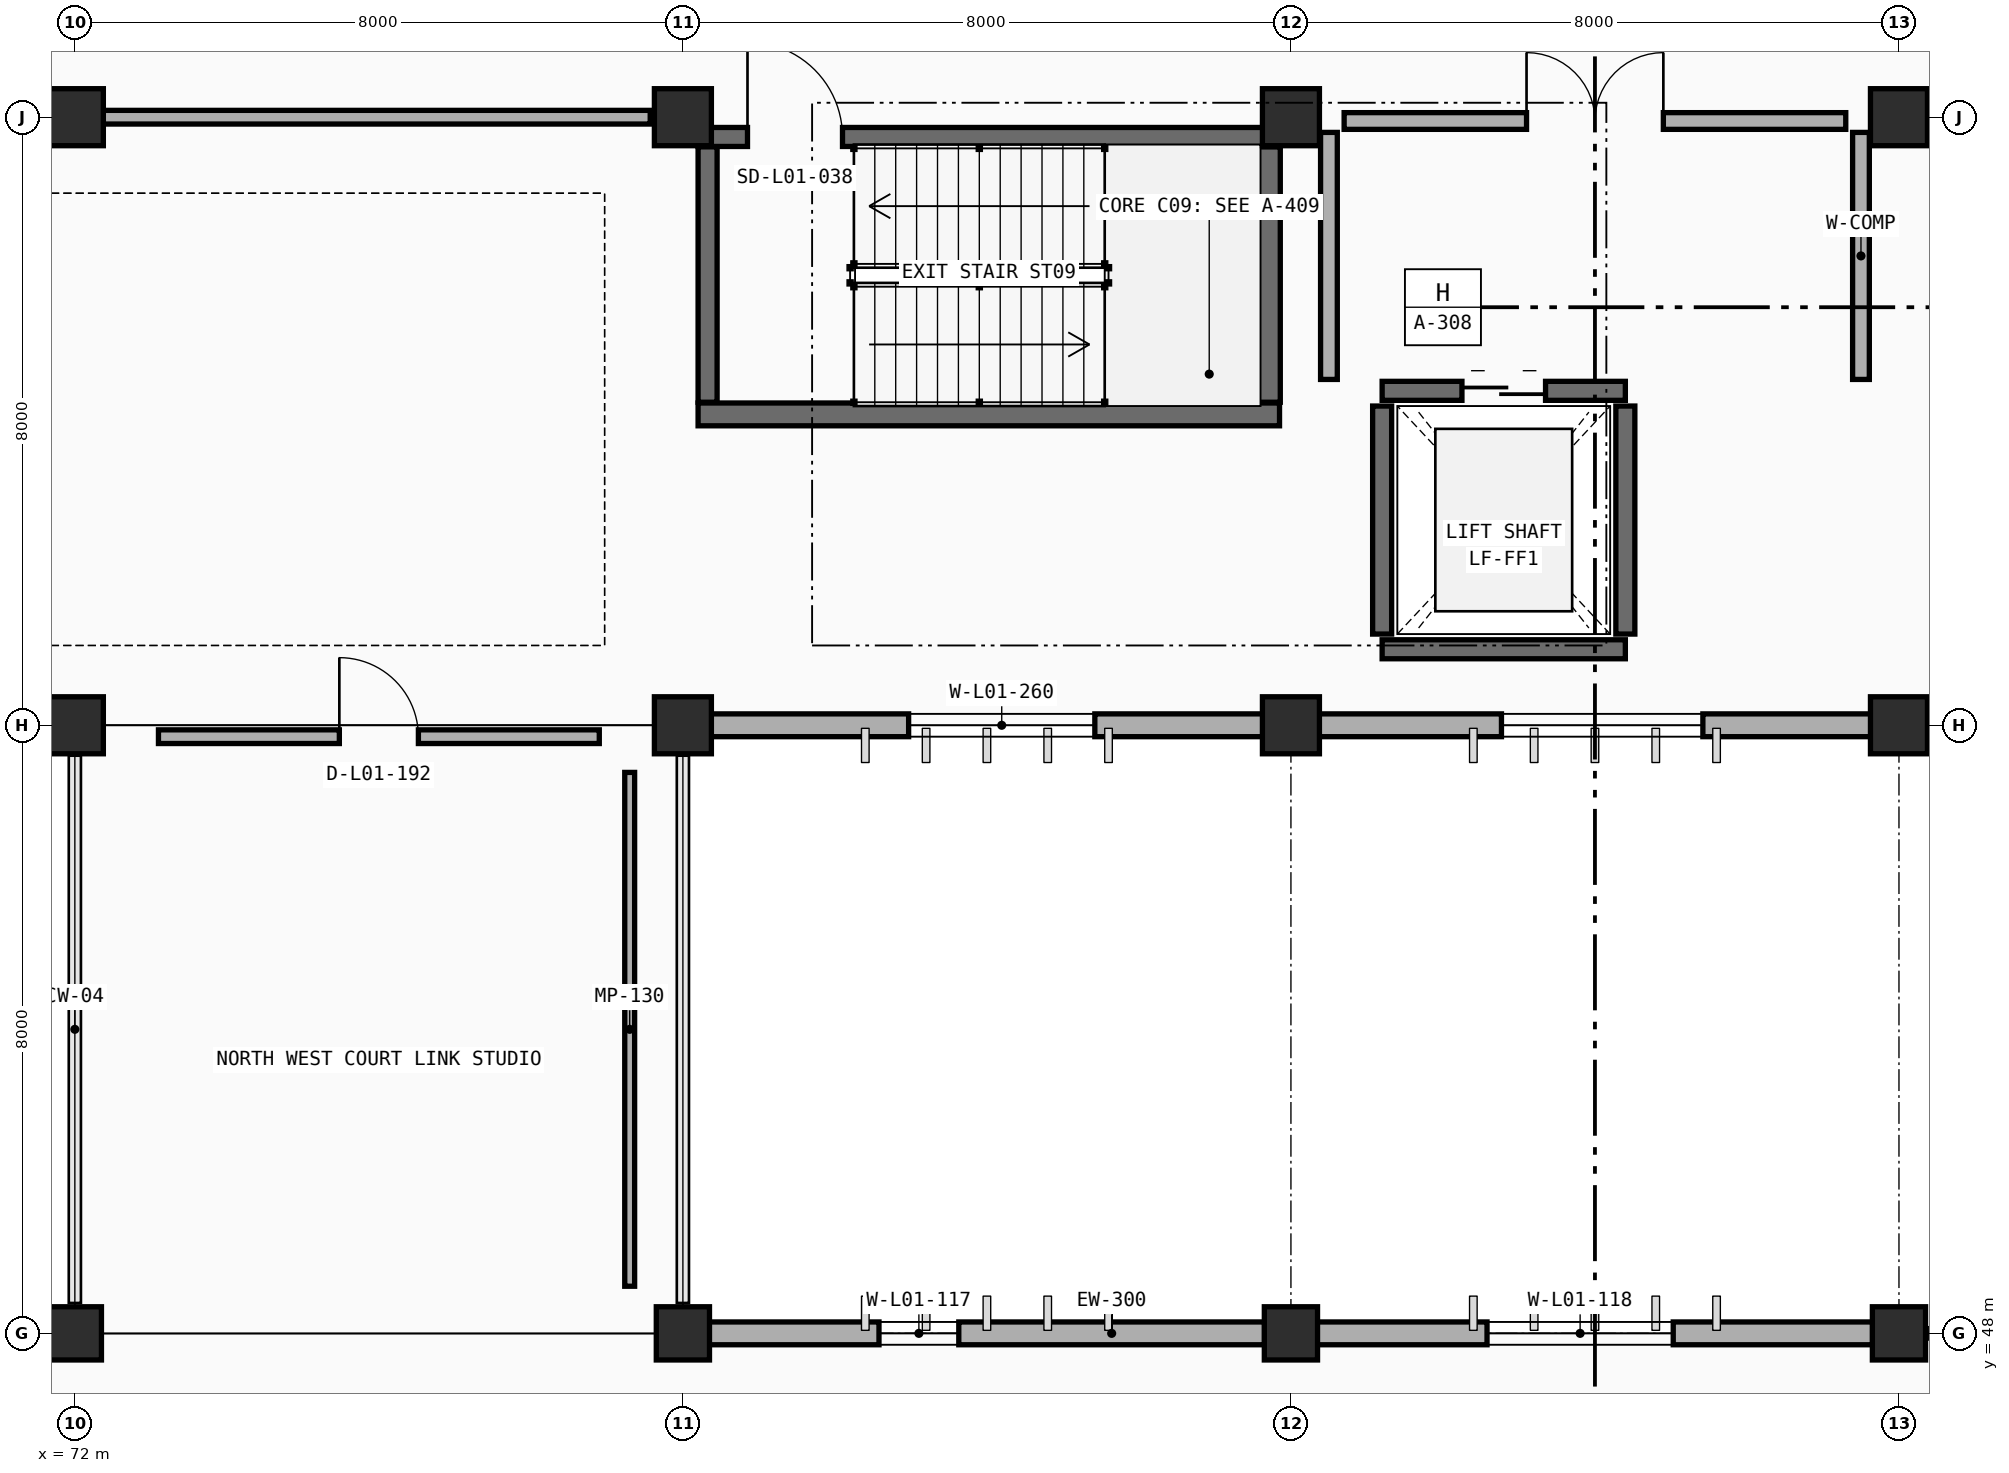
"""IFC4 building model, lengths in metres.
Left out: names, types, materials, properties, quantities, classifications, styles, units other than length and angle.
Written with IfcOpenShell. Run it as: python <this file> out.ifc"""

import sys

from ifc_helpers import new_model, si_unit, direction, frame, frame_2d, origin, origin_2d, place, context, subcontext, project, spatial, rectangle, extrude, element, fill, save


model = new_model("IFC4")
c1 = context("Model", 3, precision=1e-05, world=origin(), true_north=direction((0.0, 1.0)))
c2 = subcontext(c1, "Body", "Model", "MODEL_VIEW")
j1 = project(units=[si_unit("LENGTHUNIT", "METRE"), si_unit("PLANEANGLEUNIT", "RADIAN")], contexts=[c1])
p1 = place(None, origin())
s1 = spatial("IfcSite", under=j1, at=p1, CompositionType="ELEMENT")
p2 = place(p1, origin())
s2 = spatial("IfcBuilding", under=s1, at=p2, CompositionType="ELEMENT")
p3 = place(p2, origin())
s3 = spatial("IfcBuildingStorey", under=s2, at=p3, CompositionType="ELEMENT", Elevation=0.0)
for number, where, z_axis, x_axis in (
    (1, (72.0, 48.0, 0.0), (0.0, 0.0, 1.0), (1.0, 0.0, 0.0)),
    (2, (80.0, 48.0, 0.0), (0.0, 0.0, 1.0), (1.0, 0.0, 0.0)),
    (3, (88.0, 48.0, 0.0), (0.0, 0.0, 1.0), (1.0, 0.0, 0.0)),
    (4, (96.0, 48.0, 0.0), (0.0, 0.0, 1.0), (1.0, 0.0, 0.0)),
):
    element("IfcColumn", number, at=place(p3, frame(where, z_axis=z_axis, x_axis=x_axis)), inside=s3, PredefinedType="COLUMN", context=c2, shape_type="SweptSolid", body=[
        extrude(rectangle(XDim=0.7, YDim=0.7, at=origin_2d()), origin(), (0.0, 0.0, 1.0), 4.8),
    ])
for number, where, z_axis, x_axis in (
    (5, (72.0, 56.0, 0.0), (0.0, 0.0, 1.0), (1.0, 0.0, 0.0)),
    (6, (80.0, 56.0, 0.0), (0.0, 0.0, 1.0), (1.0, 0.0, 0.0)),
    (7, (88.0, 56.0, 0.0), (0.0, 0.0, 1.0), (1.0, 0.0, 0.0)),
    (8, (96.0, 56.0, 0.0), (0.0, 0.0, 1.0), (1.0, 0.0, 0.0)),
    (9, (72.0, 64.0, 0.0), (0.0, 0.0, 1.0), (1.0, 0.0, 0.0)),
    (10, (80.0, 64.0, 0.0), (0.0, 0.0, 1.0), (1.0, 0.0, 0.0)),
    (11, (88.0, 64.0, 0.0), (0.0, 0.0, 1.0), (1.0, 0.0, 0.0)),
    (12, (96.0, 64.0, 0.0), (0.0, 0.0, 1.0), (1.0, 0.0, 0.0)),
):
    element("IfcColumn", number, at=place(p3, frame(where, z_axis=z_axis, x_axis=x_axis)), inside=s3, PredefinedType="COLUMN", context=c2, shape_type="SweptSolid", body=[
        extrude(rectangle(XDim=0.75, YDim=0.75, at=origin_2d()), origin(), (0.0, 0.0, 1.0), 4.8),
    ])
p4 = place(p3, frame((80.347, 48.0, 0.0), z_axis=(0.0, 0.0, 1.0), x_axis=(1.0, 0.0, 0.0)))
e13 = element("IfcWall", 13, at=p4, inside=s3, PredefinedType="STANDARD", context=c2, shape_type="SweptSolid", body=[
    extrude(rectangle(XDim=7.306, YDim=0.3, at=frame_2d((3.653, 0.0))), origin(), (0.0, 0.0, 1.0), 3.91),
])
p5 = place(p4, frame((2.233, 0.0, 0.9)))
e14 = element("IfcOpeningElement", 14, at=p5, cuts=e13, PredefinedType="OPENING", context=c2, shape_type="SweptSolid", body=[
    extrude(rectangle(XDim=1.05, YDim=1.55, at=frame_2d((0.525, 0.775))), frame((0.0, 0.16, 0.0), z_axis=(0.0, -1.0, 0.0), x_axis=(1.0, 0.0, 0.0)), (0.0, 0.0, 1.0), 0.32),
])
p6 = place(p3, frame((88.347, 48.0, 0.0), z_axis=(0.0, 0.0, 1.0), x_axis=(1.0, 0.0, 0.0)))
e15 = element("IfcWall", 15, at=p6, inside=s3, PredefinedType="STANDARD", context=c2, shape_type="SweptSolid", body=[
    extrude(rectangle(XDim=7.306, YDim=0.3, at=frame_2d((3.653, 0.0))), origin(), (0.0, 0.0, 1.0), 3.91),
])
p7 = place(p6, frame((2.233, 0.0, 0.9)))
e16 = element("IfcOpeningElement", 16, at=p7, cuts=e15, PredefinedType="OPENING", context=c2, shape_type="SweptSolid", body=[
    extrude(rectangle(XDim=2.45, YDim=1.4, at=frame_2d((1.225, 0.7))), frame((0.0, 0.16, 0.0), z_axis=(0.0, -1.0, 0.0), x_axis=(1.0, 0.0, 0.0)), (0.0, 0.0, 1.0), 0.32),
])
p8 = place(p3, frame((87.628, 56.0, 0.0), z_axis=(0.0, 0.0, 1.0), x_axis=(-1.0, 0.0, 0.0)))
e17 = element("IfcWall", 17, at=p8, inside=s3, PredefinedType="STANDARD", context=c2, shape_type="SweptSolid", body=[
    extrude(rectangle(XDim=7.256, YDim=0.3, at=frame_2d((3.628, 0.0))), origin(), (0.0, 0.0, 1.0), 3.91),
])
p9 = place(p8, frame((2.208, 0.0, 0.9)))
e18 = element("IfcOpeningElement", 18, at=p9, cuts=e17, PredefinedType="OPENING", context=c2, shape_type="SweptSolid", body=[
    extrude(rectangle(XDim=2.45, YDim=1.85, at=frame_2d((1.225, 0.925))), frame((0.0, 0.16, 0.0), z_axis=(0.0, -1.0, 0.0), x_axis=(1.0, 0.0, 0.0)), (0.0, 0.0, 1.0), 0.32),
])
p10 = place(p3, frame((95.628, 56.0, 0.0), z_axis=(0.0, 0.0, 1.0), x_axis=(-1.0, 0.0, 0.0)))
e19 = element("IfcWall", 19, at=p10, inside=s3, PredefinedType="STANDARD", context=c2, shape_type="SweptSolid", body=[
    extrude(rectangle(XDim=7.256, YDim=0.3, at=frame_2d((3.628, 0.0))), origin(), (0.0, 0.0, 1.0), 3.91),
])
p11 = place(p10, frame((2.208, 0.0, 0.9)))
e20 = element("IfcOpeningElement", 20, at=p11, cuts=e19, PredefinedType="OPENING", context=c2, shape_type="SweptSolid", body=[
    extrude(rectangle(XDim=2.65, YDim=1.85, at=frame_2d((1.325, 0.925))), frame((0.0, 0.16, 0.0), z_axis=(0.0, -1.0, 0.0), x_axis=(1.0, 0.0, 0.0)), (0.0, 0.0, 1.0), 0.32),
])
p12 = place(p3, frame((103.628, 56.0, 0.0), z_axis=(0.0, 0.0, 1.0), x_axis=(-1.0, 0.0, 0.0)))
e21 = element("IfcWall", 21, at=p12, inside=s3, PredefinedType="STANDARD", context=c2, shape_type="SweptSolid", body=[
    extrude(rectangle(XDim=7.256, YDim=0.3, at=frame_2d((3.628, 0.0))), origin(), (0.0, 0.0, 1.0), 3.91),
])
p13 = place(p12, frame((2.208, 0.0, 0.9)))
e22 = element("IfcOpeningElement", 22, at=p13, cuts=e21, PredefinedType="OPENING", context=c2, shape_type="SweptSolid", body=[
    extrude(rectangle(XDim=2.85, YDim=1.85, at=frame_2d((1.425, 0.925))), frame((0.0, 0.16, 0.0), z_axis=(0.0, -1.0, 0.0), x_axis=(1.0, 0.0, 0.0)), (0.0, 0.0, 1.0), 0.32),
])
p14 = place(p3, frame((80.2, 60.09, 0.0), z_axis=(0.0, 0.0, 1.0), x_axis=(1.0, 0.0, 0.0)))
e23 = element("IfcWall", 23, at=p14, inside=s3, PredefinedType="SHEAR", context=c2, shape_type="SweptSolid", body=[
    extrude(rectangle(XDim=7.65, YDim=0.3, at=frame_2d((3.825, 0.0))), origin(), (0.0, 0.0, 1.0), 4.8),
])
p15 = place(p3, frame((87.71, 60.25, 0.0), z_axis=(0.0, 0.0, 1.0), x_axis=(0.0, 1.0, 0.0)))
e24 = element("IfcWall", 24, at=p15, inside=s3, PredefinedType="SHEAR", context=c2, shape_type="SweptSolid", body=[
    extrude(rectangle(XDim=3.36, YDim=0.3, at=frame_2d((1.68, 0.0))), origin(), (0.0, 0.0, 1.0), 4.8),
])
p16 = place(p3, frame((80.2, 63.74, 0.0), z_axis=(0.0, 0.0, 1.0), x_axis=(1.0, 0.0, 0.0)))
e25 = element("IfcWall", 25, at=p16, inside=s3, PredefinedType="SOLIDWALL", context=c2, shape_type="SweptSolid", body=[
    extrude(rectangle(XDim=7.65, YDim=0.25, at=frame_2d((3.825, 0.0))), origin(), (0.0, 0.0, 1.0), 4.8),
])
p17 = place(p16, frame((0.65, 0.0, 0.0)))
e26 = element("IfcOpeningElement", 26, at=p17, cuts=e25, PredefinedType="OPENING", context=c2, shape_type="SweptSolid", body=[
    extrude(rectangle(XDim=1.25, YDim=2.15, at=frame_2d((0.625, 1.075))), frame((0.0, 0.135, 0.0), z_axis=(0.0, -1.0, 0.0), x_axis=(1.0, 0.0, 0.0)), (0.0, 0.0, 1.0), 0.27),
])
p18 = place(p3, frame((80.325, 60.25, 0.0), z_axis=(0.0, 0.0, 1.0), x_axis=(0.0, 1.0, 0.0)))
e27 = element("IfcWall", 27, at=p18, inside=s3, PredefinedType="SOLIDWALL", context=c2, shape_type="SweptSolid", body=[
    extrude(rectangle(XDim=3.36, YDim=0.25, at=frame_2d((1.68, 0.0))), origin(), (0.0, 0.0, 1.0), 4.8),
])
p19 = place(p3, frame((89.2, 57.0, 0.0), z_axis=(0.0, 0.0, 1.0), x_axis=(1.0, 0.0, 0.0)))
e28 = element("IfcWall", 28, at=p19, inside=s3, PredefinedType="SOLIDWALL", context=c2, shape_type="SweptSolid", body=[
    extrude(rectangle(XDim=3.2, YDim=0.25, at=frame_2d((1.6, 0.0))), origin(), (0.0, 0.0, 1.0), 4.8),
])
p20 = place(p3, frame((89.2, 60.4, 0.0), z_axis=(0.0, 0.0, 1.0), x_axis=(1.0, 0.0, 0.0)))
e29 = element("IfcWall", 29, at=p20, inside=s3, PredefinedType="SOLIDWALL", context=c2, shape_type="SweptSolid", body=[
    extrude(rectangle(XDim=3.2, YDim=0.25, at=frame_2d((1.6, 0.0))), origin(), (0.0, 0.0, 1.0), 4.8),
])
p21 = place(p20, frame((1.05, 0.0, 0.0)))
e30 = element("IfcOpeningElement", 30, at=p21, cuts=e29, PredefinedType="OPENING", context=c2, shape_type="SweptSolid", body=[
    extrude(rectangle(XDim=1.1, YDim=2.15, at=frame_2d((0.55, 1.075))), frame((0.0, 0.135, 0.0), z_axis=(0.0, -1.0, 0.0), x_axis=(1.0, 0.0, 0.0)), (0.0, 0.0, 1.0), 0.27),
])
for number, where, z_axis, x_axis in (
    (31, (89.2, 57.2, 0.0), (0.0, 0.0, 1.0), (0.0, 1.0, 0.0)),
    (32, (92.4, 57.2, 0.0), (0.0, 0.0, 1.0), (0.0, 1.0, 0.0)),
):
    element("IfcWall", number, at=place(p3, frame(where, z_axis=z_axis, x_axis=x_axis)), inside=s3, PredefinedType="SOLIDWALL", context=c2, shape_type="SweptSolid", body=[
        extrude(rectangle(XDim=3.0, YDim=0.25, at=frame_2d((1.5, 0.0))), origin(), (0.0, 0.0, 1.0), 4.8),
    ])
p22 = place(p3, frame((88.7, 63.95, 0.0), z_axis=(0.0, 0.0, 1.0), x_axis=(1.0, 0.0, 0.0)))
e33 = element("IfcWall", 33, at=p22, inside=s3, PredefinedType="PARTITIONING", context=c2, shape_type="SweptSolid", body=[
    extrude(rectangle(XDim=6.6, YDim=0.22, at=frame_2d((3.3, 0.0))), origin(), (0.0, 0.0, 1.0), 3.81),
])
p23 = place(p22, frame((2.4, 0.0, 0.0)))
e34 = element("IfcOpeningElement", 34, at=p23, cuts=e33, PredefinedType="OPENING", context=c2, shape_type="SweptSolid", body=[
    extrude(rectangle(XDim=1.8, YDim=2.2, at=frame_2d((0.9, 1.1))), frame((0.0, 0.12, 0.0), z_axis=(0.0, -1.0, 0.0), x_axis=(1.0, 0.0, 0.0)), (0.0, 0.0, 1.0), 0.24),
])
for number, where, z_axis, x_axis in (
    (35, (88.5, 60.55, 0.0), (0.0, 0.0, 1.0), (0.0, 1.0, 0.0)),
    (36, (95.5, 60.55, 0.0), (0.0, 0.0, 1.0), (0.0, 1.0, 0.0)),
):
    element("IfcWall", number, at=place(p3, frame(where, z_axis=z_axis, x_axis=x_axis)), inside=s3, PredefinedType="PARTITIONING", context=c2, shape_type="SweptSolid", body=[
        extrude(rectangle(XDim=3.25, YDim=0.22, at=frame_2d((1.625, 0.0))), origin(), (0.0, 0.0, 1.0), 3.76),
    ])
p24 = place(p3, frame((56.43, 64.0, 0.0), z_axis=(0.0, 0.0, 1.0), x_axis=(1.0, 0.0, 0.0)))
e37 = element("IfcWall", 37, at=p24, inside=s3, PredefinedType="PARTITIONING", context=c2, shape_type="SweptSolid", body=[
    extrude(rectangle(XDim=23.14, YDim=0.18, at=frame_2d((11.57, 0.0))), origin(), (0.0, 0.0, 1.0), 3.81),
])
p25 = place(p24, frame((2.92, 0.0, 0.0)))
e38 = element("IfcOpeningElement", 38, at=p25, cuts=e37, PredefinedType="OPENING", context=c2, shape_type="SweptSolid", body=[
    extrude(rectangle(XDim=1.3, YDim=2.18, at=frame_2d((0.65, 1.09))), frame((0.0, 0.1, 0.0), z_axis=(0.0, -1.0, 0.0), x_axis=(1.0, 0.0, 0.0)), (0.0, 0.0, 1.0), 0.2),
])
p26 = place(p3, frame((73.1, 55.85, 0.0), z_axis=(0.0, 0.0, 1.0), x_axis=(1.0, 0.0, 0.0)))
e39 = element("IfcWall", 39, at=p26, inside=s3, PredefinedType="PARTITIONING", context=c2, shape_type="SweptSolid", body=[
    extrude(rectangle(XDim=5.8, YDim=0.18, at=frame_2d((2.9, 0.0))), origin(), (0.0, 0.0, 1.0), 3.9),
])
p27 = place(p26, frame((2.38, 0.0, 0.0)))
e40 = element("IfcOpeningElement", 40, at=p27, cuts=e39, PredefinedType="OPENING", context=c2, shape_type="SweptSolid", body=[
    extrude(rectangle(XDim=1.04, YDim=2.15, at=frame_2d((0.52, 1.075))), frame((0.0, 0.1, 0.0), z_axis=(0.0, -1.0, 0.0), x_axis=(1.0, 0.0, 0.0)), (0.0, 0.0, 1.0), 0.2),
])
p28 = place(p3, frame((79.3, 48.62, 0.0), z_axis=(0.0, 0.0, 1.0), x_axis=(0.0, 1.0, 0.0)))
e41 = element("IfcWall", 41, at=p28, inside=s3, PredefinedType="MOVABLE", context=c2, shape_type="SweptSolid", body=[
    extrude(rectangle(XDim=6.76, YDim=0.13, at=frame_2d((3.38, 0.0))), origin(), (0.0, 0.0, 1.0), 3.9),
])
p29 = place(p5, origin())
e42 = element("IfcWindow", 42, at=p29, inside=s3, PartitioningType="SINGLE_PANEL", PredefinedType="WINDOW", context=c2, shape_type="SweptSolid", body=[
    extrude(rectangle(XDim=1.05, YDim=1.55, at=frame_2d((0.525, 0.775))), frame((0.0, 0.03, 0.0), z_axis=(0.0, -1.0, 0.0), x_axis=(1.0, 0.0, 0.0)), (0.0, 0.0, 1.0), 0.06),
])
fill(e14, e42)
p30 = place(p7, origin())
e43 = element("IfcWindow", 43, at=p30, inside=s3, PartitioningType="DOUBLE_PANEL_VERTICAL", PredefinedType="WINDOW", context=c2, shape_type="SweptSolid", body=[
    extrude(rectangle(XDim=2.45, YDim=1.4, at=frame_2d((1.225, 0.7))), frame((0.0, 0.03, 0.0), z_axis=(0.0, -1.0, 0.0), x_axis=(1.0, 0.0, 0.0)), (0.0, 0.0, 1.0), 0.06),
])
fill(e16, e43)
p31 = place(p9, origin())
e44 = element("IfcWindow", 44, at=p31, inside=s3, PartitioningType="DOUBLE_PANEL_VERTICAL", PredefinedType="WINDOW", context=c2, shape_type="SweptSolid", body=[
    extrude(rectangle(XDim=2.45, YDim=1.85, at=frame_2d((1.225, 0.925))), frame((0.0, 0.03, 0.0), z_axis=(0.0, -1.0, 0.0), x_axis=(1.0, 0.0, 0.0)), (0.0, 0.0, 1.0), 0.06),
])
fill(e18, e44)
p32 = place(p11, origin())
e45 = element("IfcWindow", 45, at=p32, inside=s3, PartitioningType="DOUBLE_PANEL_VERTICAL", PredefinedType="WINDOW", context=c2, shape_type="SweptSolid", body=[
    extrude(rectangle(XDim=2.65, YDim=1.85, at=frame_2d((1.325, 0.925))), frame((0.0, 0.03, 0.0), z_axis=(0.0, -1.0, 0.0), x_axis=(1.0, 0.0, 0.0)), (0.0, 0.0, 1.0), 0.06),
])
fill(e20, e45)
p33 = place(p17, origin())
e46 = element("IfcDoor", 46, at=p33, inside=s3, OperationType="SINGLE_SWING_LEFT", PredefinedType="DOOR", context=c2, shape_type="SweptSolid", body=[
    extrude(rectangle(XDim=1.25, YDim=2.15, at=frame_2d((0.625, 1.075))), frame((0.0, 0.025, 0.0), z_axis=(0.0, -1.0, 0.0), x_axis=(1.0, 0.0, 0.0)), (0.0, 0.0, 1.0), 0.05),
])
fill(e26, e46)
p34 = place(p21, origin())
e47 = element("IfcDoor", 47, at=p34, inside=s3, OperationType="DOUBLE_DOOR_SLIDING", PredefinedType="DOOR", context=c2, shape_type="SweptSolid", body=[
    extrude(rectangle(XDim=1.1, YDim=2.15, at=frame_2d((0.55, 1.075))), frame((0.0, 0.025, 0.0), z_axis=(0.0, -1.0, 0.0), x_axis=(1.0, 0.0, 0.0)), (0.0, 0.0, 1.0), 0.05),
])
fill(e30, e47)
p35 = place(p23, origin())
e48 = element("IfcDoor", 48, at=p35, inside=s3, OperationType="DOUBLE_DOOR_SINGLE_SWING", PredefinedType="DOOR", context=c2, shape_type="SweptSolid", body=[
    extrude(rectangle(XDim=1.8, YDim=2.2, at=frame_2d((0.9, 1.1))), frame((0.0, 0.025, 0.0), z_axis=(0.0, -1.0, 0.0), x_axis=(1.0, 0.0, 0.0)), (0.0, 0.0, 1.0), 0.05),
])
fill(e34, e48)
p36 = place(p27, origin())
e49 = element("IfcDoor", 49, at=p36, inside=s3, OperationType="SINGLE_SWING_LEFT", PredefinedType="DOOR", context=c2, shape_type="SweptSolid", body=[
    extrude(rectangle(XDim=1.04, YDim=2.15, at=frame_2d((0.52, 1.075))), frame((0.0, 0.025, 0.0), z_axis=(0.0, -1.0, 0.0), x_axis=(1.0, 0.0, 0.0)), (0.0, 0.0, 1.0), 0.05),
])
fill(e40, e49)
save(model, sys.argv[1])
